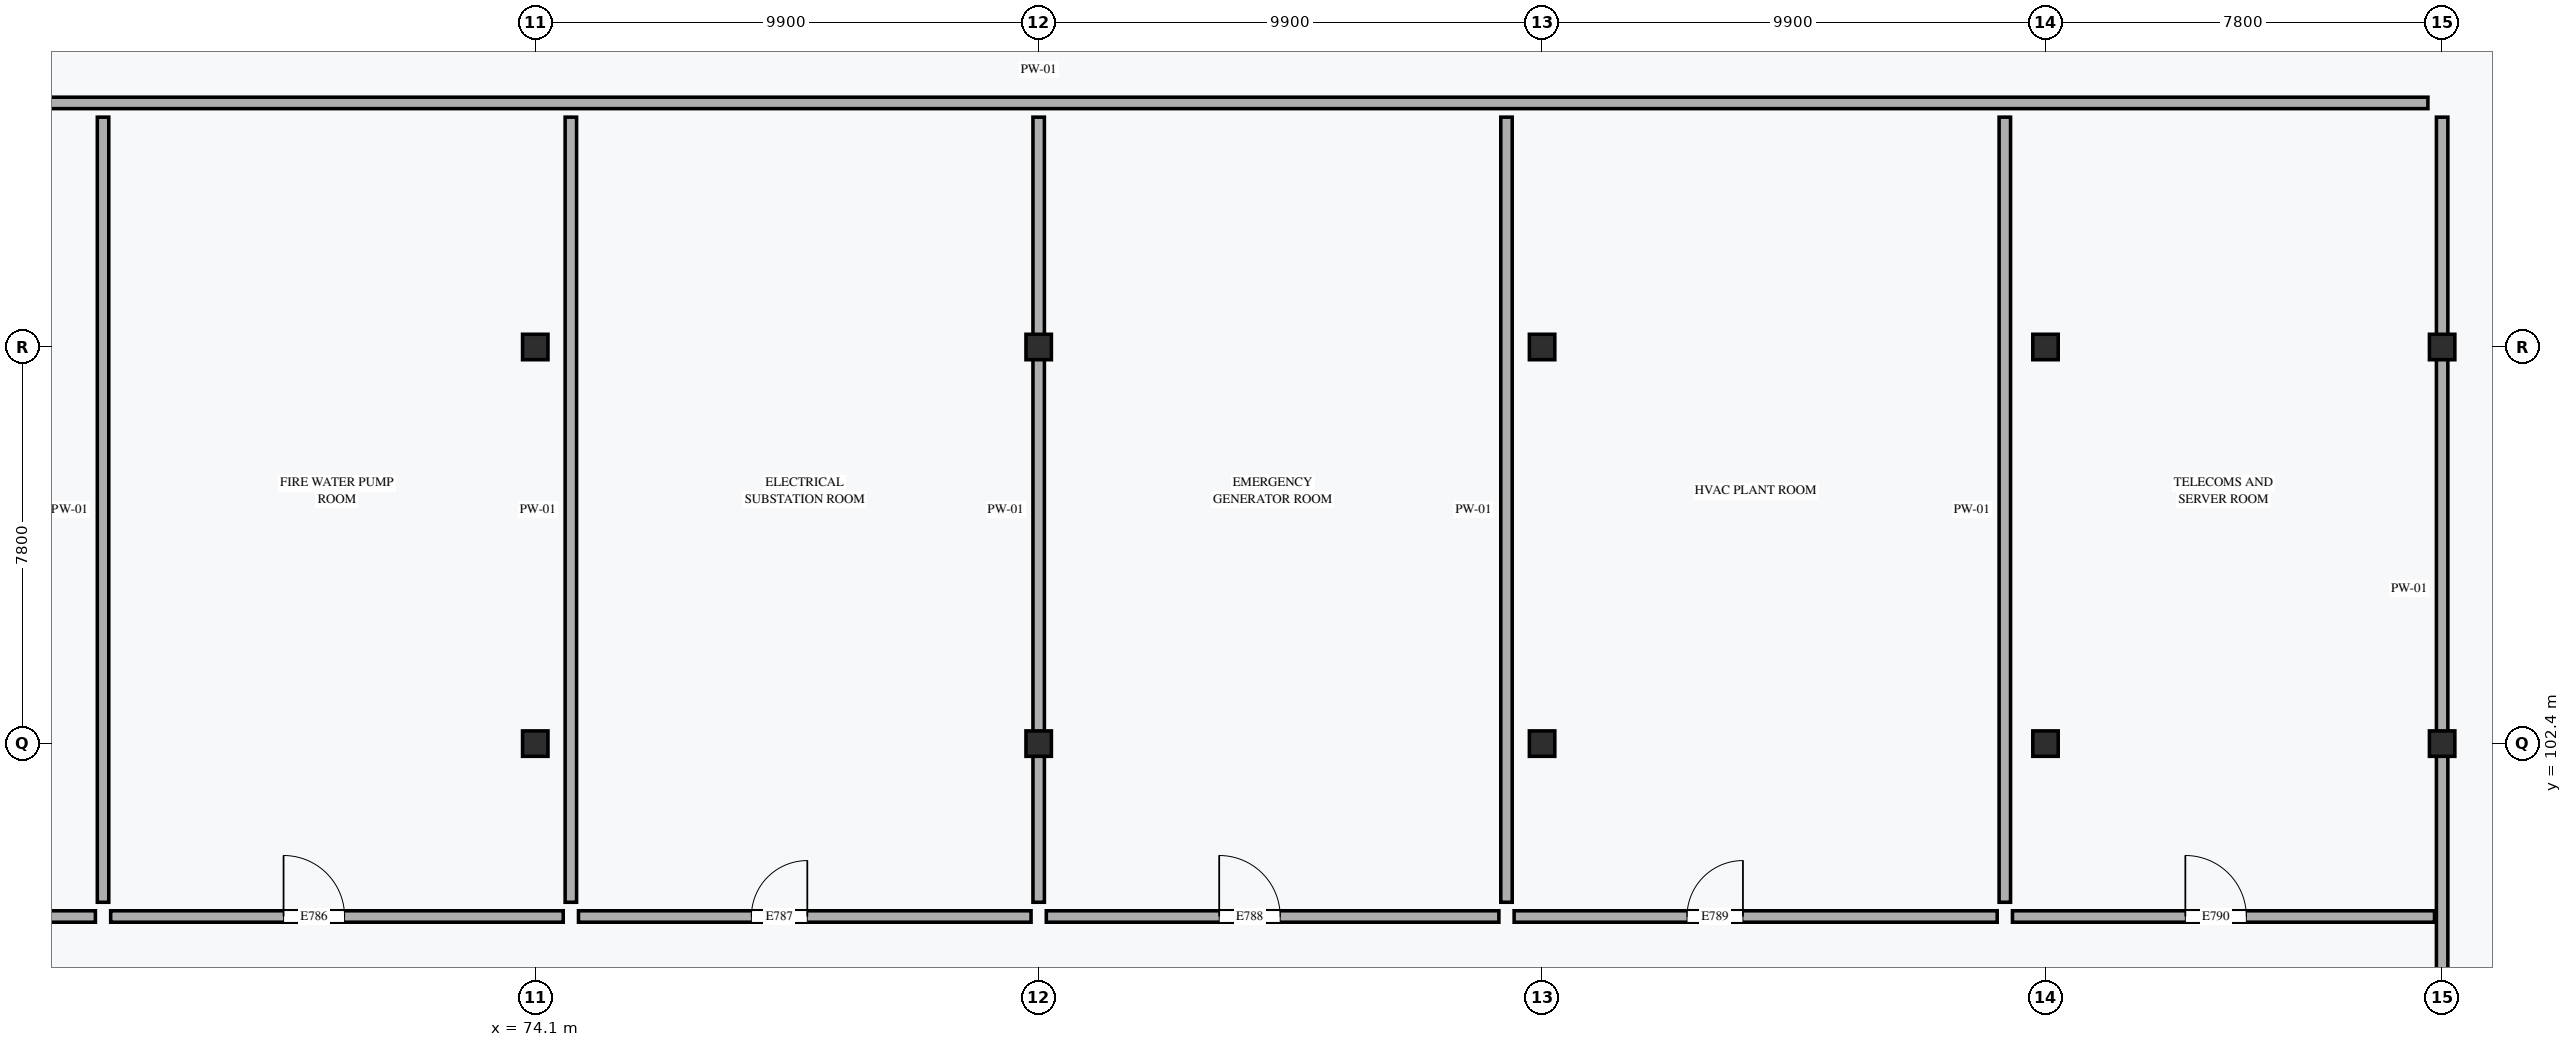
"""IFC4 building model, lengths in metres.
Left out: names, types, materials, properties, quantities, classifications, styles, units other than length and angle.
Written with IfcOpenShell. Run it as: python <this file> out.ifc"""

import sys

from ifc_helpers import new_model, si_unit, direction, frame, frame_2d, origin, origin_2d, place, context, subcontext, project, spatial, rectangle, extrude, element, fill, save


model = new_model("IFC4")
c1 = context("Model", 3, precision=1e-05, world=origin(), true_north=direction((0.0, 1.0)))
c2 = subcontext(c1, "Body", "Model", "MODEL_VIEW")
j1 = project(units=[si_unit("LENGTHUNIT", "METRE"), si_unit("PLANEANGLEUNIT", "RADIAN")], contexts=[c1])
p1 = place(None, origin())
s1 = spatial("IfcSite", under=j1, at=p1, CompositionType="ELEMENT")
p2 = place(p1, origin())
s2 = spatial("IfcBuilding", under=s1, at=p2, CompositionType="ELEMENT")
p3 = place(p2, frame((0.0, 0.0, -3.8)))
s3 = spatial("IfcBuildingStorey", under=s2, at=p3, CompositionType="ELEMENT", Elevation=-3.8)
for number, where, z_axis, x_axis in (
    (1, (74.1, 102.4, 0.0), (0.0, 0.0, 1.0), (1.0, 0.0, 0.0)),
    (2, (74.1, 110.2, 0.0), (0.0, 0.0, 1.0), (1.0, 0.0, 0.0)),
    (3, (84.0, 102.4, 0.0), (0.0, 0.0, 1.0), (1.0, 0.0, 0.0)),
    (4, (84.0, 110.2, 0.0), (0.0, 0.0, 1.0), (1.0, 0.0, 0.0)),
    (5, (93.9, 102.4, 0.0), (0.0, 0.0, 1.0), (1.0, 0.0, 0.0)),
    (6, (93.9, 110.2, 0.0), (0.0, 0.0, 1.0), (1.0, 0.0, 0.0)),
    (7, (103.8, 102.4, 0.0), (0.0, 0.0, 1.0), (1.0, 0.0, 0.0)),
    (8, (103.8, 110.2, 0.0), (0.0, 0.0, 1.0), (1.0, 0.0, 0.0)),
    (9, (111.6, 102.4, 0.0), (0.0, 0.0, 1.0), (1.0, 0.0, 0.0)),
    (10, (111.6, 110.2, 0.0), (0.0, 0.0, 1.0), (1.0, 0.0, 0.0)),
):
    element("IfcColumn", number, at=place(p3, frame(where, z_axis=z_axis, x_axis=x_axis)), inside=s3, PredefinedType="COLUMN", context=c2, shape_type="SweptSolid", body=[
        extrude(rectangle(XDim=0.5, YDim=0.5, at=origin_2d()), origin(), (0.0, 0.0, 1.0), 3.8),
    ])
p4 = place(p3, frame((111.6, 96.18, 0.0), z_axis=(0.0, 0.0, 1.0), x_axis=(0.0, 1.0, 0.0)))
e11 = element("IfcWall", 11, at=p4, inside=s3, PredefinedType="STANDARD", context=c2, shape_type="SweptSolid", body=[
    extrude(rectangle(XDim=18.54, YDim=0.225, at=frame_2d((9.27, 0.0))), origin(), (0.0, 0.0, 1.0), 3.1),
])
p5 = place(p3, frame((56.68, 115.0, 0.0), z_axis=(0.0, 0.0, 1.0), x_axis=(1.0, 0.0, 0.0)))
e12 = element("IfcWall", 12, at=p5, inside=s3, PredefinedType="STANDARD", context=c2, shape_type="SweptSolid", body=[
    extrude(rectangle(XDim=54.64, YDim=0.225, at=frame_2d((27.32, 0.0))), origin(), (0.0, 0.0, 1.0), 3.52),
])
p6 = place(p3, frame((56.55, 99.0, 0.0), z_axis=(0.0, 0.0, 1.0), x_axis=(1.0, 0.0, 0.0)))
e13 = element("IfcWall", 13, at=p6, inside=s3, PredefinedType="STANDARD", context=c2, shape_type="SweptSolid", body=[
    extrude(rectangle(XDim=8.9, YDim=0.225, at=frame_2d((4.45, 0.0))), origin(), (0.0, 0.0, 1.0), 3.52),
])
p7 = place(p6, frame((3.4, 0.0, 0.0)))
e14 = element("IfcOpeningElement", 14, at=p7, cuts=e13, PredefinedType="OPENING", context=c2, shape_type="SweptSolid", body=[
    extrude(rectangle(XDim=1.1, YDim=2.15, at=frame_2d((0.55, 1.075))), frame((0.0, 0.123, 0.0), z_axis=(0.0, -1.0, 0.0), x_axis=(1.0, 0.0, 0.0)), (0.0, 0.0, 1.0), 0.245),
])
p8 = place(p3, frame((65.6, 99.28, 0.0), z_axis=(0.0, 0.0, 1.0), x_axis=(0.0, 1.0, 0.0)))
e15 = element("IfcWall", 15, at=p8, inside=s3, PredefinedType="STANDARD", context=c2, shape_type="SweptSolid", body=[
    extrude(rectangle(XDim=15.44, YDim=0.225, at=frame_2d((7.72, 0.0))), origin(), (0.0, 0.0, 1.0), 3.52),
])
p9 = place(p3, frame((65.75, 99.0, 0.0), z_axis=(0.0, 0.0, 1.0), x_axis=(1.0, 0.0, 0.0)))
e16 = element("IfcWall", 16, at=p9, inside=s3, PredefinedType="STANDARD", context=c2, shape_type="SweptSolid", body=[
    extrude(rectangle(XDim=8.9, YDim=0.225, at=frame_2d((4.45, 0.0))), origin(), (0.0, 0.0, 1.0), 3.52),
])
p10 = place(p9, frame((3.4, 0.0, 0.0)))
e17 = element("IfcOpeningElement", 17, at=p10, cuts=e16, PredefinedType="OPENING", context=c2, shape_type="SweptSolid", body=[
    extrude(rectangle(XDim=1.2, YDim=2.18, at=frame_2d((0.6, 1.09))), frame((0.0, 0.123, 0.0), z_axis=(0.0, -1.0, 0.0), x_axis=(1.0, 0.0, 0.0)), (0.0, 0.0, 1.0), 0.245),
])
p11 = place(p3, frame((74.8, 99.28, 0.0), z_axis=(0.0, 0.0, 1.0), x_axis=(0.0, 1.0, 0.0)))
e18 = element("IfcWall", 18, at=p11, inside=s3, PredefinedType="STANDARD", context=c2, shape_type="SweptSolid", body=[
    extrude(rectangle(XDim=15.44, YDim=0.225, at=frame_2d((7.72, 0.0))), origin(), (0.0, 0.0, 1.0), 3.52),
])
p12 = place(p3, frame((74.95, 99.0, 0.0), z_axis=(0.0, 0.0, 1.0), x_axis=(1.0, 0.0, 0.0)))
e19 = element("IfcWall", 19, at=p12, inside=s3, PredefinedType="STANDARD", context=c2, shape_type="SweptSolid", body=[
    extrude(rectangle(XDim=8.9, YDim=0.225, at=frame_2d((4.45, 0.0))), origin(), (0.0, 0.0, 1.0), 3.52),
])
p13 = place(p12, frame((3.4, 0.0, 0.0)))
e20 = element("IfcOpeningElement", 20, at=p13, cuts=e19, PredefinedType="OPENING", context=c2, shape_type="SweptSolid", body=[
    extrude(rectangle(XDim=1.1, YDim=2.15, at=frame_2d((0.55, 1.075))), frame((0.0, 0.123, 0.0), z_axis=(0.0, -1.0, 0.0), x_axis=(1.0, 0.0, 0.0)), (0.0, 0.0, 1.0), 0.245),
])
p14 = place(p3, frame((84.0, 99.28, 0.0), z_axis=(0.0, 0.0, 1.0), x_axis=(0.0, 1.0, 0.0)))
e21 = element("IfcWall", 21, at=p14, inside=s3, PredefinedType="STANDARD", context=c2, shape_type="SweptSolid", body=[
    extrude(rectangle(XDim=15.44, YDim=0.225, at=frame_2d((7.72, 0.0))), origin(), (0.0, 0.0, 1.0), 3.1),
])
p15 = place(p3, frame((84.15, 99.0, 0.0), z_axis=(0.0, 0.0, 1.0), x_axis=(1.0, 0.0, 0.0)))
e22 = element("IfcWall", 22, at=p15, inside=s3, PredefinedType="STANDARD", context=c2, shape_type="SweptSolid", body=[
    extrude(rectangle(XDim=8.9, YDim=0.225, at=frame_2d((4.45, 0.0))), origin(), (0.0, 0.0, 1.0), 3.52),
])
p16 = place(p15, frame((3.4, 0.0, 0.0)))
e23 = element("IfcOpeningElement", 23, at=p16, cuts=e22, PredefinedType="OPENING", context=c2, shape_type="SweptSolid", body=[
    extrude(rectangle(XDim=1.2, YDim=2.18, at=frame_2d((0.6, 1.09))), frame((0.0, 0.123, 0.0), z_axis=(0.0, -1.0, 0.0), x_axis=(1.0, 0.0, 0.0)), (0.0, 0.0, 1.0), 0.245),
])
p17 = place(p3, frame((93.2, 99.28, 0.0), z_axis=(0.0, 0.0, 1.0), x_axis=(0.0, 1.0, 0.0)))
e24 = element("IfcWall", 24, at=p17, inside=s3, PredefinedType="STANDARD", context=c2, shape_type="SweptSolid", body=[
    extrude(rectangle(XDim=15.44, YDim=0.225, at=frame_2d((7.72, 0.0))), origin(), (0.0, 0.0, 1.0), 3.52),
])
p18 = place(p3, frame((93.35, 99.0, 0.0), z_axis=(0.0, 0.0, 1.0), x_axis=(1.0, 0.0, 0.0)))
e25 = element("IfcWall", 25, at=p18, inside=s3, PredefinedType="STANDARD", context=c2, shape_type="SweptSolid", body=[
    extrude(rectangle(XDim=9.5, YDim=0.225, at=frame_2d((4.75, 0.0))), origin(), (0.0, 0.0, 1.0), 3.52),
])
p19 = place(p18, frame((3.4, 0.0, 0.0)))
e26 = element("IfcOpeningElement", 26, at=p19, cuts=e25, PredefinedType="OPENING", context=c2, shape_type="SweptSolid", body=[
    extrude(rectangle(XDim=1.1, YDim=2.15, at=frame_2d((0.55, 1.075))), frame((0.0, 0.123, 0.0), z_axis=(0.0, -1.0, 0.0), x_axis=(1.0, 0.0, 0.0)), (0.0, 0.0, 1.0), 0.245),
])
p20 = place(p3, frame((103.0, 99.28, 0.0), z_axis=(0.0, 0.0, 1.0), x_axis=(0.0, 1.0, 0.0)))
e27 = element("IfcWall", 27, at=p20, inside=s3, PredefinedType="STANDARD", context=c2, shape_type="SweptSolid", body=[
    extrude(rectangle(XDim=15.44, YDim=0.225, at=frame_2d((7.72, 0.0))), origin(), (0.0, 0.0, 1.0), 3.52),
])
p21 = place(p3, frame((103.15, 99.0, 0.0), z_axis=(0.0, 0.0, 1.0), x_axis=(1.0, 0.0, 0.0)))
e28 = element("IfcWall", 28, at=p21, inside=s3, PredefinedType="STANDARD", context=c2, shape_type="SweptSolid", body=[
    extrude(rectangle(XDim=8.3, YDim=0.225, at=frame_2d((4.15, 0.0))), origin(), (0.0, 0.0, 1.0), 3.52),
])
p22 = place(p21, frame((3.4, 0.0, 0.0)))
e29 = element("IfcOpeningElement", 29, at=p22, cuts=e28, PredefinedType="OPENING", context=c2, shape_type="SweptSolid", body=[
    extrude(rectangle(XDim=1.2, YDim=2.18, at=frame_2d((0.6, 1.09))), frame((0.0, 0.123, 0.0), z_axis=(0.0, -1.0, 0.0), x_axis=(1.0, 0.0, 0.0)), (0.0, 0.0, 1.0), 0.245),
])
p23 = place(p10, origin())
e30 = element("IfcDoor", 30, at=p23, inside=s3, OperationType="SINGLE_SWING_LEFT", PredefinedType="DOOR", context=c2, shape_type="SweptSolid", body=[
    extrude(rectangle(XDim=1.2, YDim=2.18, at=frame_2d((0.6, 1.09))), frame((0.0, 0.025, 0.0), z_axis=(0.0, -1.0, 0.0), x_axis=(1.0, 0.0, 0.0)), (0.0, 0.0, 1.0), 0.05),
])
fill(e17, e30)
p24 = place(p13, origin())
e31 = element("IfcDoor", 31, at=p24, inside=s3, OperationType="SINGLE_SWING_RIGHT", PredefinedType="DOOR", context=c2, shape_type="SweptSolid", body=[
    extrude(rectangle(XDim=1.1, YDim=2.15, at=frame_2d((0.55, 1.075))), frame((0.0, 0.025, 0.0), z_axis=(0.0, -1.0, 0.0), x_axis=(1.0, 0.0, 0.0)), (0.0, 0.0, 1.0), 0.05),
])
fill(e20, e31)
p25 = place(p16, origin())
e32 = element("IfcDoor", 32, at=p25, inside=s3, OperationType="SINGLE_SWING_LEFT", PredefinedType="DOOR", context=c2, shape_type="SweptSolid", body=[
    extrude(rectangle(XDim=1.2, YDim=2.18, at=frame_2d((0.6, 1.09))), frame((0.0, 0.025, 0.0), z_axis=(0.0, -1.0, 0.0), x_axis=(1.0, 0.0, 0.0)), (0.0, 0.0, 1.0), 0.05),
])
fill(e23, e32)
p26 = place(p19, origin())
e33 = element("IfcDoor", 33, at=p26, inside=s3, OperationType="SINGLE_SWING_RIGHT", PredefinedType="DOOR", context=c2, shape_type="SweptSolid", body=[
    extrude(rectangle(XDim=1.1, YDim=2.15, at=frame_2d((0.55, 1.075))), frame((0.0, 0.025, 0.0), z_axis=(0.0, -1.0, 0.0), x_axis=(1.0, 0.0, 0.0)), (0.0, 0.0, 1.0), 0.05),
])
fill(e26, e33)
p27 = place(p22, origin())
e34 = element("IfcDoor", 34, at=p27, inside=s3, OperationType="SINGLE_SWING_LEFT", PredefinedType="DOOR", context=c2, shape_type="SweptSolid", body=[
    extrude(rectangle(XDim=1.2, YDim=2.18, at=frame_2d((0.6, 1.09))), frame((0.0, 0.025, 0.0), z_axis=(0.0, -1.0, 0.0), x_axis=(1.0, 0.0, 0.0)), (0.0, 0.0, 1.0), 0.05),
])
fill(e29, e34)
save(model, sys.argv[1])
